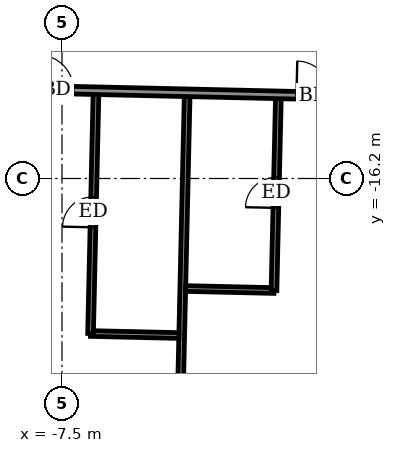
"""IFC4 building model, lengths in metres.
Left out: names, types, materials, properties, quantities, classifications, styles, units other than length and angle.
Written with IfcOpenShell. Run it as: python <this file> out.ifc"""

import sys

from ifc_helpers import new_model, si_unit, direction, frame, frame_2d, origin, place, context, subcontext, project, spatial, rectangle, extrude, element, fill, save


model = new_model("IFC4")
c1 = context("Model", 3, precision=1e-05, world=origin(), true_north=direction((0.0, 1.0)))
c2 = subcontext(c1, "Body", "Model", "MODEL_VIEW")
j1 = project(units=[si_unit("LENGTHUNIT", "METRE"), si_unit("PLANEANGLEUNIT", "RADIAN")], contexts=[c1])
p1 = place(None, origin())
s1 = spatial("IfcSite", under=j1, at=p1, CompositionType="ELEMENT")
p2 = place(p1, origin())
s2 = spatial("IfcBuilding", under=s1, at=p2, CompositionType="ELEMENT")
p3 = place(p2, frame((0.0, 0.0, 316.9)))
s3 = spatial("IfcBuildingStorey", under=s2, at=p3, CompositionType="ELEMENT", Elevation=316.9)
p4 = place(p3, frame((-4.467, -25.492, 0.0), z_axis=(0.0, 0.0, 1.0), x_axis=(0.022708327922, 0.999742132674, 0.0)))
e1 = element("IfcWall", 1, at=p4, inside=s3, PredefinedType="PARTITIONING", context=c2, shape_type="SweptSolid", body=[
    extrude(rectangle(XDim=11.45, YDim=0.15, at=frame_2d((5.725, 0.0))), origin(), (0.0, 0.0, 1.0), 2.5),
])
p5 = place(p3, frame((-6.749, -20.279, 0.0), z_axis=(0.0, 0.0, 1.0), x_axis=(0.999740478815, -0.022781023197, 0.0)))
e2 = element("IfcWall", 2, at=p5, inside=s3, PredefinedType="PARTITIONING", context=c2, shape_type="SweptSolid", body=[
    extrude(rectangle(XDim=2.325, YDim=0.15, at=frame_2d((1.163, 0.0))), origin(), (0.0, 0.0, 1.0), 3.05),
])
p6 = place(p3, frame((-6.749, -20.279, 0.0), z_axis=(0.0, 0.0, 1.0), x_axis=(0.02274256342, 0.999741354456, 0.0)))
e3 = element("IfcWall", 3, at=p6, inside=s3, PredefinedType="PARTITIONING", context=c2, shape_type="SweptSolid", body=[
    extrude(rectangle(XDim=6.291, YDim=0.15, at=frame_2d((3.146, 0.0))), origin(), (0.0, 0.0, 1.0), 3.05),
])
p7 = place(p6, frame((2.795, 0.0, 0.0)))
e4 = element("IfcOpeningElement", 4, at=p7, cuts=e3, PredefinedType="OPENING", context=c2, shape_type="SweptSolid", body=[
    extrude(rectangle(XDim=0.8, YDim=2.1, at=frame_2d((0.4, 1.05))), frame((0.0, 0.085, 0.0), z_axis=(0.0, -1.0, 0.0), x_axis=(1.0, 0.0, 0.0)), (0.0, 0.0, 1.0), 0.17),
])
p8 = place(p3, frame((-4.246, -19.095, 0.0), z_axis=(0.0, 0.0, 1.0), x_axis=(0.999740260747, -0.02279059109, 0.0)))
e5 = element("IfcWall", 5, at=p8, inside=s3, PredefinedType="PARTITIONING", context=c2, shape_type="SweptSolid", body=[
    extrude(rectangle(XDim=2.324, YDim=0.15, at=frame_2d((1.162, 0.0))), origin(), (0.0, 0.0, 1.0), 3.05),
])
p9 = place(p3, frame((-1.922, -19.148, 0.0), z_axis=(0.0, 0.0, 1.0), x_axis=(0.02281804195, 0.999739634586, 0.0)))
e6 = element("IfcWall", 6, at=p9, inside=s3, PredefinedType="PARTITIONING", context=c2, shape_type="SweptSolid", body=[
    extrude(rectangle(XDim=5.05, YDim=0.15, at=frame_2d((2.525, 0.0))), origin(), (0.0, 0.0, 1.0), 3.05),
])
p10 = place(p9, frame((2.175, 0.0, 0.0)))
e7 = element("IfcOpeningElement", 7, at=p10, cuts=e6, PredefinedType="OPENING", context=c2, shape_type="SweptSolid", body=[
    extrude(rectangle(XDim=0.8, YDim=2.1, at=frame_2d((0.4, 1.05))), frame((0.0, 0.085, 0.0), z_axis=(0.0, -1.0, 0.0), x_axis=(1.0, 0.0, 0.0)), (0.0, 0.0, 1.0), 0.17),
])
p11 = place(p3, frame((-31.347, -13.329, 0.0), z_axis=(0.0, 0.0, 1.0), x_axis=(0.999742613079, -0.022687168058, 0.0)))
e8 = element("IfcWall", 8, at=p11, inside=s3, PredefinedType="PARTITIONING", context=c2, shape_type="SweptSolid", body=[
    extrude(rectangle(XDim=58.799, YDim=0.2, at=frame_2d((29.399, 0.0))), origin(), (0.0, 0.0, 1.0), 3.05),
])
p12 = place(p11, frame((2.075, 0.0, 0.0)))
e9 = element("IfcOpeningElement", 9, at=p12, cuts=e8, PredefinedType="OPENING", context=c2, shape_type="SweptSolid", body=[
    extrude(rectangle(XDim=1.0, YDim=2.1, at=frame_2d((0.5, 1.05))), frame((0.0, 0.11, 0.0), z_axis=(0.0, -1.0, 0.0), x_axis=(1.0, 0.0, 0.0)), (0.0, 0.0, 1.0), 0.22),
])
p13 = place(p11, frame((7.5, 0.0, 0.0)))
e10 = element("IfcOpeningElement", 10, at=p13, cuts=e8, PredefinedType="OPENING", context=c2, shape_type="SweptSolid", body=[
    extrude(rectangle(XDim=0.9, YDim=2.1, at=frame_2d((0.45, 1.05))), frame((0.0, 0.11, 0.0), z_axis=(0.0, -1.0, 0.0), x_axis=(1.0, 0.0, 0.0)), (0.0, 0.0, 1.0), 0.22),
])
p14 = place(p11, frame((12.35, 0.0, 0.0)))
e11 = element("IfcOpeningElement", 11, at=p14, cuts=e8, PredefinedType="OPENING", context=c2, shape_type="SweptSolid", body=[
    extrude(rectangle(XDim=0.9, YDim=2.1, at=frame_2d((0.45, 1.05))), frame((0.0, 0.11, 0.0), z_axis=(0.0, -1.0, 0.0), x_axis=(1.0, 0.0, 0.0)), (0.0, 0.0, 1.0), 0.22),
])
p15 = place(p11, frame((14.425, 0.0, 0.0)))
e12 = element("IfcOpeningElement", 12, at=p15, cuts=e8, PredefinedType="OPENING", context=c2, shape_type="SweptSolid", body=[
    extrude(rectangle(XDim=0.9, YDim=2.1, at=frame_2d((0.45, 1.05))), frame((0.0, 0.11, 0.0), z_axis=(0.0, -1.0, 0.0), x_axis=(1.0, 0.0, 0.0)), (0.0, 0.0, 1.0), 0.22),
])
p16 = place(p11, frame((21.225, 0.0, 0.0)))
e13 = element("IfcOpeningElement", 13, at=p16, cuts=e8, PredefinedType="OPENING", context=c2, shape_type="SweptSolid", body=[
    extrude(rectangle(XDim=0.9, YDim=2.1, at=frame_2d((0.45, 1.05))), frame((0.0, 0.11, 0.0), z_axis=(0.0, -1.0, 0.0), x_axis=(1.0, 0.0, 0.0)), (0.0, 0.0, 1.0), 0.22),
])
p17 = place(p11, frame((23.25, 0.0, 0.0)))
e14 = element("IfcOpeningElement", 14, at=p17, cuts=e8, PredefinedType="OPENING", context=c2, shape_type="SweptSolid", body=[
    extrude(rectangle(XDim=0.9, YDim=2.1, at=frame_2d((0.45, 1.05))), frame((0.0, 0.11, 0.0), z_axis=(0.0, -1.0, 0.0), x_axis=(1.0, 0.0, 0.0)), (0.0, 0.0, 1.0), 0.22),
])
p18 = place(p11, frame((30.025, 0.0, 0.0)))
e15 = element("IfcOpeningElement", 15, at=p18, cuts=e8, PredefinedType="OPENING", context=c2, shape_type="SweptSolid", body=[
    extrude(rectangle(XDim=0.9, YDim=2.1, at=frame_2d((0.45, 1.05))), frame((0.0, 0.11, 0.0), z_axis=(0.0, -1.0, 0.0), x_axis=(1.0, 0.0, 0.0)), (0.0, 0.0, 1.0), 0.22),
])
p19 = place(p11, frame((32.025, 0.0, 0.0)))
e16 = element("IfcOpeningElement", 16, at=p19, cuts=e8, PredefinedType="OPENING", context=c2, shape_type="SweptSolid", body=[
    extrude(rectangle(XDim=0.9, YDim=2.1, at=frame_2d((0.45, 1.05))), frame((0.0, 0.11, 0.0), z_axis=(0.0, -1.0, 0.0), x_axis=(1.0, 0.0, 0.0)), (0.0, 0.0, 1.0), 0.22),
])
p20 = place(p11, frame((38.95, 0.0, 0.0)))
e17 = element("IfcOpeningElement", 17, at=p20, cuts=e8, PredefinedType="OPENING", context=c2, shape_type="SweptSolid", body=[
    extrude(rectangle(XDim=0.9, YDim=2.1, at=frame_2d((0.45, 1.05))), frame((0.0, 0.11, 0.0), z_axis=(0.0, -1.0, 0.0), x_axis=(1.0, 0.0, 0.0)), (0.0, 0.0, 1.0), 0.22),
])
p21 = place(p11, frame((41.05, 0.0, 0.0)))
e18 = element("IfcOpeningElement", 18, at=p21, cuts=e8, PredefinedType="OPENING", context=c2, shape_type="SweptSolid", body=[
    extrude(rectangle(XDim=0.9, YDim=2.1, at=frame_2d((0.45, 1.05))), frame((0.0, 0.11, 0.0), z_axis=(0.0, -1.0, 0.0), x_axis=(1.0, 0.0, 0.0)), (0.0, 0.0, 1.0), 0.22),
])
p22 = place(p11, frame((47.925, 0.0, 0.0)))
e19 = element("IfcOpeningElement", 19, at=p22, cuts=e8, PredefinedType="OPENING", context=c2, shape_type="SweptSolid", body=[
    extrude(rectangle(XDim=0.9, YDim=2.1, at=frame_2d((0.45, 1.05))), frame((0.0, 0.11, 0.0), z_axis=(0.0, -1.0, 0.0), x_axis=(1.0, 0.0, 0.0)), (0.0, 0.0, 1.0), 0.22),
])
p23 = place(p11, frame((53.618, 0.0, 0.0)))
e20 = element("IfcOpeningElement", 20, at=p23, cuts=e8, PredefinedType="OPENING", context=c2, shape_type="SweptSolid", body=[
    extrude(rectangle(XDim=1.0, YDim=2.1, at=frame_2d((0.5, 1.05))), frame((0.0, 0.11, 0.0), z_axis=(0.0, -1.0, 0.0), x_axis=(1.0, 0.0, 0.0)), (0.0, 0.0, 1.0), 0.22),
])
p24 = place(p17, origin())
e21 = element("IfcDoor", 21, at=p24, inside=s3, OperationType="SINGLE_SWING_RIGHT", PredefinedType="DOOR", context=c2, shape_type="SweptSolid", body=[
    extrude(rectangle(XDim=0.9, YDim=2.1, at=frame_2d((0.45, 1.05))), frame((0.0, 0.025, 0.0), z_axis=(0.0, -1.0, 0.0), x_axis=(1.0, 0.0, 0.0)), (0.0, 0.0, 1.0), 0.05),
])
fill(e14, e21)
p25 = place(p7, origin())
e22 = element("IfcDoor", 22, at=p25, inside=s3, OperationType="SINGLE_SWING_RIGHT", PredefinedType="DOOR", context=c2, shape_type="SweptSolid", body=[
    extrude(rectangle(XDim=0.8, YDim=2.1, at=frame_2d((0.4, 1.05))), frame((0.0, 0.025, 0.0), z_axis=(0.0, -1.0, 0.0), x_axis=(1.0, 0.0, 0.0)), (0.0, 0.0, 1.0), 0.05),
])
fill(e4, e22)
p26 = place(p18, origin())
e23 = element("IfcDoor", 23, at=p26, inside=s3, OperationType="SINGLE_SWING_LEFT", PredefinedType="DOOR", context=c2, shape_type="SweptSolid", body=[
    extrude(rectangle(XDim=0.9, YDim=2.1, at=frame_2d((0.45, 1.05))), frame((0.0, 0.025, 0.0), z_axis=(0.0, -1.0, 0.0), x_axis=(1.0, 0.0, 0.0)), (0.0, 0.0, 1.0), 0.05),
])
fill(e15, e23)
p27 = place(p10, origin())
e24 = element("IfcDoor", 24, at=p27, inside=s3, OperationType="SINGLE_SWING_LEFT", PredefinedType="DOOR", context=c2, shape_type="SweptSolid", body=[
    extrude(rectangle(XDim=0.8, YDim=2.1, at=frame_2d((0.4, 1.05))), frame((0.0, 0.025, 0.0), z_axis=(0.0, -1.0, 0.0), x_axis=(1.0, 0.0, 0.0)), (0.0, 0.0, 1.0), 0.05),
])
fill(e7, e24)
save(model, sys.argv[1])
